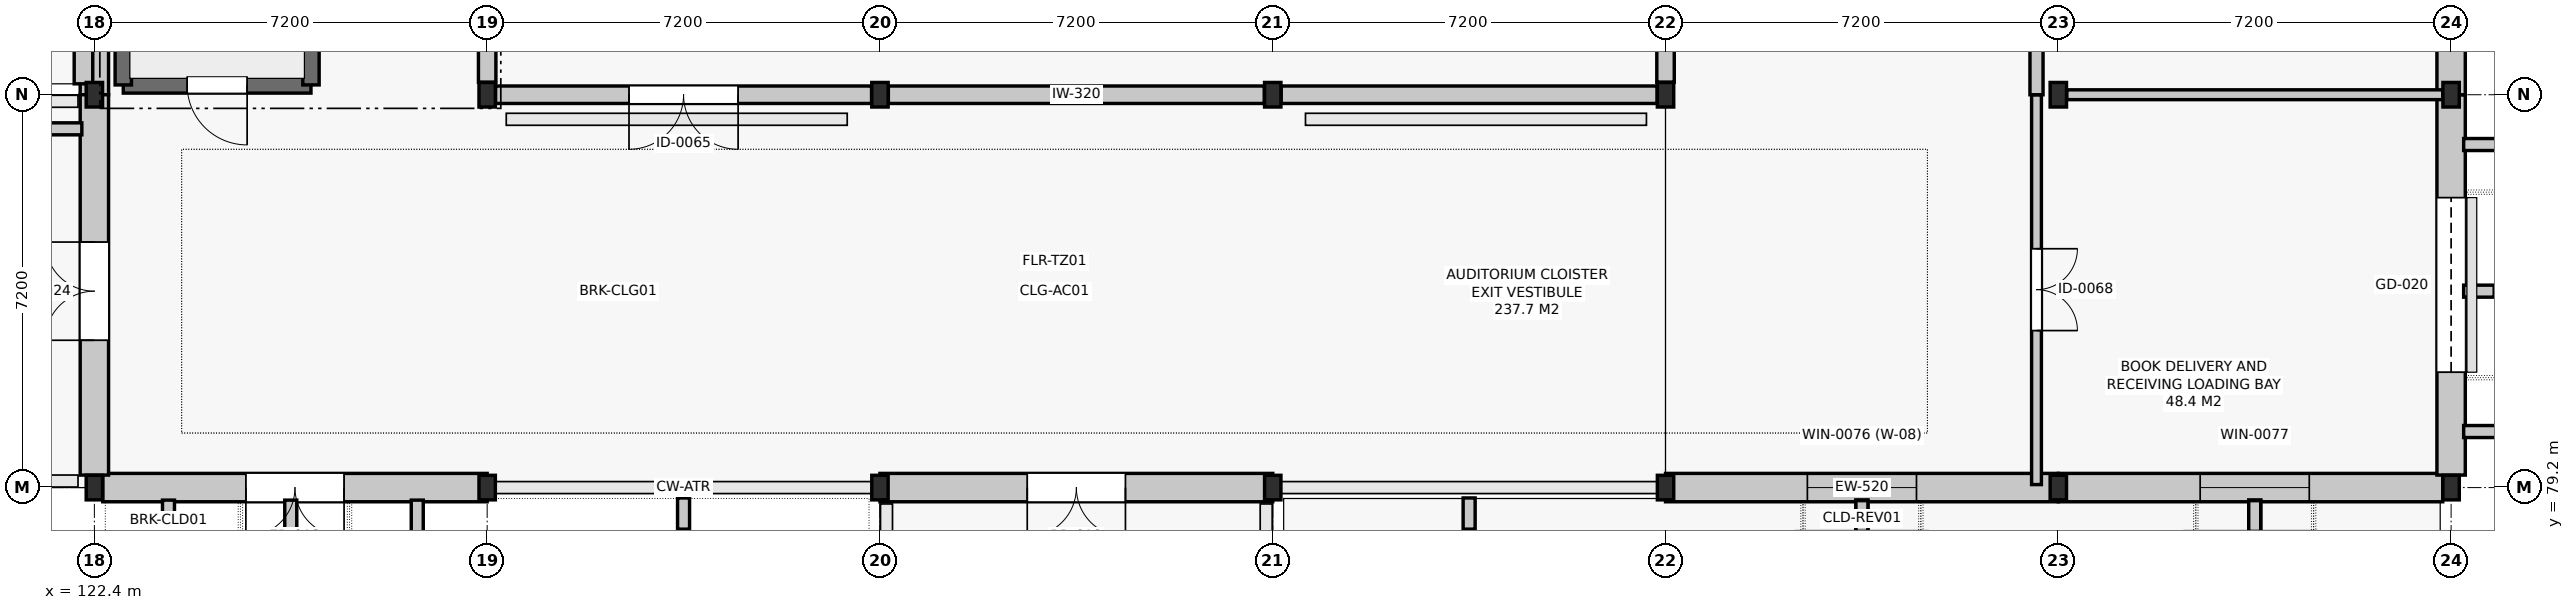
"""IFC4 building model, lengths in metres.
Left out: names, types, materials, properties, quantities, classifications, styles, units other than length and angle.
Written with IfcOpenShell. Run it as: python <this file> out.ifc"""

import sys

from ifc_helpers import new_model, si_unit, direction, frame, frame_2d, origin, origin_2d, place, context, subcontext, project, spatial, rectangle, i_section, extrude, element, fill, save


model = new_model("IFC4")
c1 = context("Model", 3, precision=1e-05, world=origin(), true_north=direction((0.0, 1.0)))
c2 = subcontext(c1, "Body", "Model", "MODEL_VIEW")
j1 = project(units=[si_unit("LENGTHUNIT", "METRE"), si_unit("PLANEANGLEUNIT", "RADIAN")], contexts=[c1])
p1 = place(None, origin())
s1 = spatial("IfcSite", under=j1, at=p1, CompositionType="ELEMENT")
p2 = place(p1, origin())
s2 = spatial("IfcBuilding", under=s1, at=p2, CompositionType="ELEMENT")
p3 = place(p2, origin())
s3 = spatial("IfcBuildingStorey", under=s2, at=p3, CompositionType="ELEMENT", Elevation=0.0)
for number, where, z_axis, x_axis in (
    (1, (122.4, 79.2, 0.0), (0.0, 0.0, 1.0), (1.0, 0.0, 0.0)),
    (2, (122.4, 86.4, 0.0), (0.0, 0.0, 1.0), (1.0, 0.0, 0.0)),
    (3, (129.6, 79.2, 0.0), (0.0, 0.0, 1.0), (1.0, 0.0, 0.0)),
    (4, (129.6, 86.4, 0.0), (0.0, 0.0, 1.0), (1.0, 0.0, 0.0)),
    (5, (136.8, 79.2, 0.0), (0.0, 0.0, 1.0), (1.0, 0.0, 0.0)),
    (6, (136.8, 86.4, 0.0), (0.0, 0.0, 1.0), (1.0, 0.0, 0.0)),
    (7, (144.0, 79.2, 0.0), (0.0, 0.0, 1.0), (1.0, 0.0, 0.0)),
    (8, (144.0, 86.4, 0.0), (0.0, 0.0, 1.0), (1.0, 0.0, 0.0)),
    (9, (151.2, 79.2, 0.0), (0.0, 0.0, 1.0), (1.0, 0.0, 0.0)),
    (10, (151.2, 86.4, 0.0), (0.0, 0.0, 1.0), (1.0, 0.0, 0.0)),
    (11, (158.4, 79.2, 0.0), (0.0, 0.0, 1.0), (1.0, 0.0, 0.0)),
    (12, (158.4, 86.4, 0.0), (0.0, 0.0, 1.0), (1.0, 0.0, 0.0)),
    (13, (165.6, 79.2, 0.0), (0.0, 0.0, 1.0), (1.0, 0.0, 0.0)),
    (14, (165.6, 86.4, 0.0), (0.0, 0.0, 1.0), (1.0, 0.0, 0.0)),
):
    element("IfcColumn", number, at=place(p3, frame(where, z_axis=z_axis, x_axis=x_axis)), inside=s3, PredefinedType="COLUMN", context=c2, shape_type="SweptSolid", body=[
        extrude(i_section(OverallWidth=0.3, OverallDepth=0.45, WebThickness=0.014, FlangeThickness=0.026, FilletRadius=0.027, at=origin_2d()), origin(), (0.0, 0.0, 1.0), 5.4),
    ])
p4 = place(p3, frame((122.554, 79.2, 0.0), z_axis=(0.0, 0.0, 1.0), x_axis=(1.0, 0.0, 0.0)))
e15 = element("IfcWall", 15, at=p4, inside=s3, PredefinedType="SOLIDWALL", context=c2, shape_type="SweptSolid", body=[
    extrude(rectangle(XDim=7.046, YDim=0.52, at=frame_2d((3.523, 0.0))), origin(), (0.0, 0.0, 1.0), 4.4),
])
p5 = place(p4, frame((2.623, 0.0, 0.0)))
e16 = element("IfcOpeningElement", 16, at=p5, cuts=e15, PredefinedType="OPENING", context=c2, shape_type="SweptSolid", body=[
    extrude(rectangle(XDim=1.8, YDim=2.2, at=frame_2d((0.9, 1.1))), frame((0.0, 0.272, 0.0), z_axis=(0.0, -1.0, 0.0), x_axis=(1.0, 0.0, 0.0)), (0.0, 0.0, 1.0), 0.544),
])
p6 = place(p3, frame((136.8, 79.2, 0.0), z_axis=(0.0, 0.0, 1.0), x_axis=(1.0, 0.0, 0.0)))
e17 = element("IfcWall", 17, at=p6, inside=s3, PredefinedType="SOLIDWALL", context=c2, shape_type="SweptSolid", body=[
    extrude(rectangle(XDim=7.2, YDim=0.52, at=frame_2d((3.6, 0.0))), origin(), (0.0, 0.0, 1.0), 4.4),
])
p7 = place(p6, frame((2.7, 0.0, 0.0)))
e18 = element("IfcOpeningElement", 18, at=p7, cuts=e17, PredefinedType="OPENING", context=c2, shape_type="SweptSolid", body=[
    extrude(rectangle(XDim=1.8, YDim=2.3, at=frame_2d((0.9, 1.15))), frame((0.0, 0.272, 0.0), z_axis=(0.0, -1.0, 0.0), x_axis=(1.0, 0.0, 0.0)), (0.0, 0.0, 1.0), 0.544),
])
p8 = place(p3, frame((151.2, 79.2, 0.0), z_axis=(0.0, 0.0, 1.0), x_axis=(1.0, 0.0, 0.0)))
e19 = element("IfcWall", 19, at=p8, inside=s3, PredefinedType="SOLIDWALL", context=c2, shape_type="SweptSolid", body=[
    extrude(rectangle(XDim=7.2, YDim=0.52, at=frame_2d((3.6, 0.0))), origin(), (0.0, 0.0, 1.0), 4.4),
])
p9 = place(p8, frame((2.6, 0.0, 1.35)))
e20 = element("IfcOpeningElement", 20, at=p9, cuts=e19, PredefinedType="OPENING", context=c2, shape_type="SweptSolid", body=[
    extrude(rectangle(XDim=2.0, YDim=1.5, at=frame_2d((1.0, 0.75))), frame((0.0, 0.272, 0.0), z_axis=(0.0, -1.0, 0.0), x_axis=(1.0, 0.0, 0.0)), (0.0, 0.0, 1.0), 0.544),
])
p10 = place(p3, frame((158.4, 79.2, 0.0), z_axis=(0.0, 0.0, 1.0), x_axis=(1.0, 0.0, 0.0)))
e21 = element("IfcWall", 21, at=p10, inside=s3, PredefinedType="SOLIDWALL", context=c2, shape_type="SweptSolid", body=[
    extrude(rectangle(XDim=7.046, YDim=0.52, at=frame_2d((3.523, 0.0))), origin(), (0.0, 0.0, 1.0), 4.4),
])
p11 = place(p10, frame((2.6, 0.0, 1.35)))
e22 = element("IfcOpeningElement", 22, at=p11, cuts=e21, PredefinedType="OPENING", context=c2, shape_type="SweptSolid", body=[
    extrude(rectangle(XDim=2.0, YDim=1.5, at=frame_2d((1.0, 0.75))), frame((0.0, 0.272, 0.0), z_axis=(0.0, -1.0, 0.0), x_axis=(1.0, 0.0, 0.0)), (0.0, 0.0, 1.0), 0.544),
])
p12 = place(p3, frame((165.6, 79.429, 0.0), z_axis=(0.0, 0.0, 1.0), x_axis=(0.0, 1.0, 0.0)))
e23 = element("IfcWall", 23, at=p12, inside=s3, PredefinedType="SOLIDWALL", context=c2, shape_type="SweptSolid", body=[
    extrude(rectangle(XDim=6.971, YDim=0.52, at=frame_2d((3.485, 0.0))), origin(), (0.0, 0.0, 1.0), 4.4),
])
p13 = place(p12, frame((1.885, 0.0, 0.0)))
e24 = element("IfcOpeningElement", 24, at=p13, cuts=e23, PredefinedType="OPENING", context=c2, shape_type="SweptSolid", body=[
    extrude(rectangle(XDim=3.2, YDim=3.4, at=frame_2d((1.6, 1.7))), frame((0.0, 0.272, 0.0), z_axis=(0.0, -1.0, 0.0), x_axis=(1.0, 0.0, 0.0)), (0.0, 0.0, 1.0), 0.544),
])
p14 = place(p3, frame((165.6, 86.4, 0.0), z_axis=(0.0, 0.0, 1.0), x_axis=(0.0, 1.0, 0.0)))
e25 = element("IfcWall", 25, at=p14, inside=s3, PredefinedType="SOLIDWALL", context=c2, shape_type="SweptSolid", body=[
    extrude(rectangle(XDim=7.2, YDim=0.52, at=frame_2d((3.6, 0.0))), origin(), (0.0, 0.0, 1.0), 4.4),
])
p15 = place(p14, frame((2.6, 0.0, 1.35)))
e26 = element("IfcOpeningElement", 26, at=p15, cuts=e25, PredefinedType="OPENING", context=c2, shape_type="SweptSolid", body=[
    extrude(rectangle(XDim=2.0, YDim=1.5, at=frame_2d((1.0, 0.75))), frame((0.0, 0.272, 0.0), z_axis=(0.0, -1.0, 0.0), x_axis=(1.0, 0.0, 0.0)), (0.0, 0.0, 1.0), 0.544),
])
p16 = place(p3, frame((122.4, 93.6, 0.0), z_axis=(0.0, 0.0, 1.0), x_axis=(0.0, -1.0, 0.0)))
e27 = element("IfcWall", 27, at=p16, inside=s3, PredefinedType="SOLIDWALL", context=c2, shape_type="SweptSolid", body=[
    extrude(rectangle(XDim=7.2, YDim=0.52, at=frame_2d((3.6, 0.0))), origin(), (0.0, 0.0, 1.0), 4.4),
])
p17 = place(p16, frame((2.6, 0.0, 1.35)))
e28 = element("IfcOpeningElement", 28, at=p17, cuts=e27, PredefinedType="OPENING", context=c2, shape_type="SweptSolid", body=[
    extrude(rectangle(XDim=2.0, YDim=1.5, at=frame_2d((1.0, 0.75))), frame((0.0, 0.272, 0.0), z_axis=(0.0, -1.0, 0.0), x_axis=(1.0, 0.0, 0.0)), (0.0, 0.0, 1.0), 0.544),
])
p18 = place(p3, frame((122.4, 86.4, 0.0), z_axis=(0.0, 0.0, 1.0), x_axis=(0.0, -1.0, 0.0)))
e29 = element("IfcWall", 29, at=p18, inside=s3, PredefinedType="SOLIDWALL", context=c2, shape_type="SweptSolid", body=[
    extrude(rectangle(XDim=6.971, YDim=0.52, at=frame_2d((3.485, 0.0))), origin(), (0.0, 0.0, 1.0), 4.4),
])
p19 = place(p18, frame((2.7, 0.0, 0.0)))
e30 = element("IfcOpeningElement", 30, at=p19, cuts=e29, PredefinedType="OPENING", context=c2, shape_type="SweptSolid", body=[
    extrude(rectangle(XDim=1.8, YDim=2.3, at=frame_2d((0.9, 1.15))), frame((0.0, 0.272, 0.0), z_axis=(0.0, -1.0, 0.0), x_axis=(1.0, 0.0, 0.0)), (0.0, 0.0, 1.0), 0.544),
])
p20 = place(p3, frame((122.2, 86.6, -0.905), z_axis=(0.0, 0.0, 1.0), x_axis=(0.0, 1.0, 0.0)))
e31 = element("IfcWall", 31, at=p20, inside=s3, PredefinedType="SOLIDWALL", context=c2, shape_type="SweptSolid", body=[
    extrude(rectangle(XDim=28.85, YDim=0.34, at=frame_2d((14.425, 0.0))), origin(), (0.0, 0.0, 1.0), 0.905),
])
p21 = place(p3, frame((122.93, 86.58, 0.0), z_axis=(0.0, 0.0, 1.0), x_axis=(1.0, 0.0, 0.0)))
e32 = element("IfcWall", 32, at=p21, inside=s3, PredefinedType="SHEAR", context=c2, shape_type="SweptSolid", body=[
    extrude(rectangle(XDim=3.44, YDim=0.3, at=frame_2d((1.72, 0.0))), origin(), (0.0, 0.0, 1.0), 5.12),
])
p22 = place(p21, frame((1.17, 0.0, 0.0)))
e33 = element("IfcOpeningElement", 33, at=p22, cuts=e32, PredefinedType="OPENING", context=c2, shape_type="SweptSolid", body=[
    extrude(rectangle(XDim=1.1, YDim=2.15, at=frame_2d((0.55, 1.075))), frame((0.0, 0.162, 0.0), z_axis=(0.0, -1.0, 0.0), x_axis=(1.0, 0.0, 0.0)), (0.0, 0.0, 1.0), 0.324),
])
for number, where, z_axis, x_axis in (
    (34, (126.37, 86.58, 0.0), (0.0, 0.0, 1.0), (0.0, 1.0, 0.0)),
    (35, (122.93, 93.52, 0.0), (0.0, 0.0, 1.0), (0.0, -1.0, 0.0)),
):
    element("IfcWall", number, at=place(p3, frame(where, z_axis=z_axis, x_axis=x_axis)), inside=s3, PredefinedType="SHEAR", context=c2, shape_type="SweptSolid", body=[
        extrude(rectangle(XDim=6.94, YDim=0.3, at=frame_2d((3.47, 0.0))), origin(), (0.0, 0.0, 1.0), 5.12),
    ])
p23 = place(p3, frame((129.754, 86.4, 0.0), z_axis=(0.0, 0.0, 1.0), x_axis=(1.0, 0.0, 0.0)))
e36 = element("IfcWall", 36, at=p23, inside=s3, PredefinedType="SOLIDWALL", context=c2, shape_type="SweptSolid", body=[
    extrude(rectangle(XDim=6.892, YDim=0.32, at=frame_2d((3.446, 0.0))), origin(), (0.0, 0.0, 1.0), 5.105),
])
p24 = place(p23, frame((2.446, 0.0, 0.0)))
e37 = element("IfcOpeningElement", 37, at=p24, cuts=e36, PredefinedType="OPENING", context=c2, shape_type="SweptSolid", body=[
    extrude(rectangle(XDim=2.0, YDim=2.4, at=frame_2d((1.0, 1.2))), frame((0.0, 0.172, 0.0), z_axis=(0.0, -1.0, 0.0), x_axis=(1.0, 0.0, 0.0)), (0.0, 0.0, 1.0), 0.344),
])
for number, where, z_axis, x_axis in (
    (38, (136.954, 86.4, 0.0), (0.0, 0.0, 1.0), (1.0, 0.0, 0.0)),
    (39, (144.154, 86.4, 0.0), (0.0, 0.0, 1.0), (1.0, 0.0, 0.0)),
):
    element("IfcWall", number, at=place(p3, frame(where, z_axis=z_axis, x_axis=x_axis)), inside=s3, PredefinedType="SOLIDWALL", context=c2, shape_type="SweptSolid", body=[
        extrude(rectangle(XDim=6.892, YDim=0.32, at=frame_2d((3.446, 0.0))), origin(), (0.0, 0.0, 1.0), 5.105),
    ])
p25 = place(p3, frame((158.554, 86.4, 0.0), z_axis=(0.0, 0.0, 1.0), x_axis=(1.0, 0.0, 0.0)))
e40 = element("IfcWall", 40, at=p25, inside=s3, PredefinedType="PARTITIONING", context=c2, shape_type="SweptSolid", body=[
    extrude(rectangle(XDim=6.892, YDim=0.18, at=frame_2d((3.446, 0.0))), origin(), (0.0, 0.0, 1.0), 4.615),
])
for number, where, z_axis, x_axis in (
    (41, (129.6, 86.629, 0.0), (0.0, 0.0, 1.0), (0.0, 1.0, 0.0)),
    (42, (151.2, 86.629, 0.0), (0.0, 0.0, 1.0), (0.0, 1.0, 0.0)),
):
    element("IfcWall", number, at=place(p3, frame(where, z_axis=z_axis, x_axis=x_axis)), inside=s3, PredefinedType="SOLIDWALL", context=c2, shape_type="SweptSolid", body=[
        extrude(rectangle(XDim=6.742, YDim=0.32, at=frame_2d((3.371, 0.0))), origin(), (0.0, 0.0, 1.0), 5.105),
    ])
p26 = place(p3, frame((158.0, 79.255, 0.0), z_axis=(0.0, 0.0, 1.0), x_axis=(0.0, 1.0, 0.0)))
e43 = element("IfcWall", 43, at=p26, inside=s3, PredefinedType="PARTITIONING", context=c2, shape_type="SweptSolid", body=[
    extrude(rectangle(XDim=7.145, YDim=0.18, at=frame_2d((3.573, 0.0))), origin(), (0.0, 0.0, 1.0), 4.555),
])
p27 = place(p26, frame((2.823, 0.0, 0.0)))
e44 = element("IfcOpeningElement", 44, at=p27, cuts=e43, PredefinedType="OPENING", context=c2, shape_type="SweptSolid", body=[
    extrude(rectangle(XDim=1.5, YDim=2.2, at=frame_2d((0.75, 1.1))), frame((0.0, 0.102, 0.0), z_axis=(0.0, -1.0, 0.0), x_axis=(1.0, 0.0, 0.0)), (0.0, 0.0, 1.0), 0.204),
])
p28 = place(p3, frame((158.0, 86.4, 0.0), z_axis=(0.0, 0.0, 1.0), x_axis=(0.0, 1.0, 0.0)))
e45 = element("IfcWall", 45, at=p28, inside=s3, PredefinedType="SOLIDWALL", context=c2, shape_type="SweptSolid", body=[
    extrude(rectangle(XDim=12.478, YDim=0.24, at=frame_2d((6.239, 0.0))), origin(), (0.0, 0.0, 1.0), 4.615),
])
p29 = place(p28, frame((3.799, 0.0, 0.0)))
e46 = element("IfcOpeningElement", 46, at=p29, cuts=e45, PredefinedType="OPENING", context=c2, shape_type="SweptSolid", body=[
    extrude(rectangle(XDim=2.0, YDim=2.4, at=frame_2d((1.0, 1.2))), frame((0.0, 0.132, 0.0), z_axis=(0.0, -1.0, 0.0), x_axis=(1.0, 0.0, 0.0)), (0.0, 0.0, 1.0), 0.264),
])
p30 = place(p5, frame((1.8, 0.0, 0.0), z_axis=(0.0, 0.0, 1.0), x_axis=(-1.0, 0.0, 0.0)))
e47 = element("IfcDoor", 47, at=p30, inside=s3, OperationType="DOUBLE_DOOR_SINGLE_SWING", PredefinedType="DOOR", context=c2, shape_type="SweptSolid", body=[
    extrude(rectangle(XDim=1.8, YDim=2.2, at=frame_2d((0.9, 1.1))), frame((0.0, 0.025, 0.0), z_axis=(0.0, -1.0, 0.0), x_axis=(1.0, 0.0, 0.0)), (0.0, 0.0, 1.0), 0.05),
])
fill(e16, e47)
p31 = place(p7, frame((1.8, 0.0, 0.0), z_axis=(0.0, 0.0, 1.0), x_axis=(-1.0, 0.0, 0.0)))
e48 = element("IfcDoor", 48, at=p31, inside=s3, OperationType="DOUBLE_DOOR_SINGLE_SWING", PredefinedType="DOOR", context=c2, shape_type="SweptSolid", body=[
    extrude(rectangle(XDim=1.8, YDim=2.3, at=frame_2d((0.9, 1.15))), frame((0.0, 0.025, 0.0), z_axis=(0.0, -1.0, 0.0), x_axis=(1.0, 0.0, 0.0)), (0.0, 0.0, 1.0), 0.05),
])
fill(e18, e48)
p32 = place(p9, origin())
e49 = element("IfcWindow", 49, at=p32, inside=s3, PartitioningType="SINGLE_PANEL", PredefinedType="WINDOW", context=c2, shape_type="SweptSolid", body=[
    extrude(rectangle(XDim=2.0, YDim=1.5, at=frame_2d((1.0, 0.75))), frame((0.0, 0.03, 0.0), z_axis=(0.0, -1.0, 0.0), x_axis=(1.0, 0.0, 0.0)), (0.0, 0.0, 1.0), 0.06),
])
fill(e20, e49)
p33 = place(p11, origin())
e50 = element("IfcWindow", 50, at=p33, inside=s3, PartitioningType="SINGLE_PANEL", PredefinedType="WINDOW", context=c2, shape_type="SweptSolid", body=[
    extrude(rectangle(XDim=2.0, YDim=1.5, at=frame_2d((1.0, 0.75))), frame((0.0, 0.03, 0.0), z_axis=(0.0, -1.0, 0.0), x_axis=(1.0, 0.0, 0.0)), (0.0, 0.0, 1.0), 0.06),
])
fill(e22, e50)
p34 = place(p13, origin())
e51 = element("IfcDoor", 51, at=p34, inside=s3, OperationType="ROLLINGUP", PredefinedType="GATE", context=c2, shape_type="SweptSolid", body=[
    extrude(rectangle(XDim=3.2, YDim=3.4, at=frame_2d((1.6, 1.7))), frame((0.0, 0.025, 0.0), z_axis=(0.0, -1.0, 0.0), x_axis=(1.0, 0.0, 0.0)), (0.0, 0.0, 1.0), 0.05),
])
fill(e24, e51)
p35 = place(p19, frame((1.8, 0.0, 0.0), z_axis=(0.0, 0.0, 1.0), x_axis=(-1.0, 0.0, 0.0)))
e52 = element("IfcDoor", 52, at=p35, inside=s3, OperationType="DOUBLE_DOOR_SINGLE_SWING", PredefinedType="DOOR", context=c2, shape_type="SweptSolid", body=[
    extrude(rectangle(XDim=1.8, YDim=2.3, at=frame_2d((0.9, 1.15))), frame((0.0, 0.025, 0.0), z_axis=(0.0, -1.0, 0.0), x_axis=(1.0, 0.0, 0.0)), (0.0, 0.0, 1.0), 0.05),
])
fill(e30, e52)
p36 = place(p22, frame((1.1, 0.0, 0.0), z_axis=(0.0, 0.0, 1.0), x_axis=(-1.0, 0.0, 0.0)))
e53 = element("IfcDoor", 53, at=p36, inside=s3, OperationType="SINGLE_SWING_LEFT", PredefinedType="DOOR", context=c2, shape_type="SweptSolid", body=[
    extrude(rectangle(XDim=1.1, YDim=2.15, at=frame_2d((0.55, 1.075))), frame((0.0, 0.025, 0.0), z_axis=(0.0, -1.0, 0.0), x_axis=(1.0, 0.0, 0.0)), (0.0, 0.0, 1.0), 0.05),
])
fill(e33, e53)
p37 = place(p24, frame((2.0, 0.0, 0.0), z_axis=(0.0, 0.0, 1.0), x_axis=(-1.0, 0.0, 0.0)))
e54 = element("IfcDoor", 54, at=p37, inside=s3, OperationType="DOUBLE_DOOR_SINGLE_SWING", PredefinedType="DOOR", context=c2, shape_type="SweptSolid", body=[
    extrude(rectangle(XDim=2.0, YDim=2.4, at=frame_2d((1.0, 1.2))), frame((0.0, 0.025, 0.0), z_axis=(0.0, -1.0, 0.0), x_axis=(1.0, 0.0, 0.0)), (0.0, 0.0, 1.0), 0.05),
])
fill(e37, e54)
p38 = place(p27, frame((1.5, 0.0, 0.0), z_axis=(0.0, 0.0, 1.0), x_axis=(-1.0, 0.0, 0.0)))
e55 = element("IfcDoor", 55, at=p38, inside=s3, OperationType="DOUBLE_DOOR_SINGLE_SWING", PredefinedType="DOOR", context=c2, shape_type="SweptSolid", body=[
    extrude(rectangle(XDim=1.5, YDim=2.2, at=frame_2d((0.75, 1.1))), frame((0.0, 0.025, 0.0), z_axis=(0.0, -1.0, 0.0), x_axis=(1.0, 0.0, 0.0)), (0.0, 0.0, 1.0), 0.05),
])
fill(e44, e55)
save(model, sys.argv[1])
